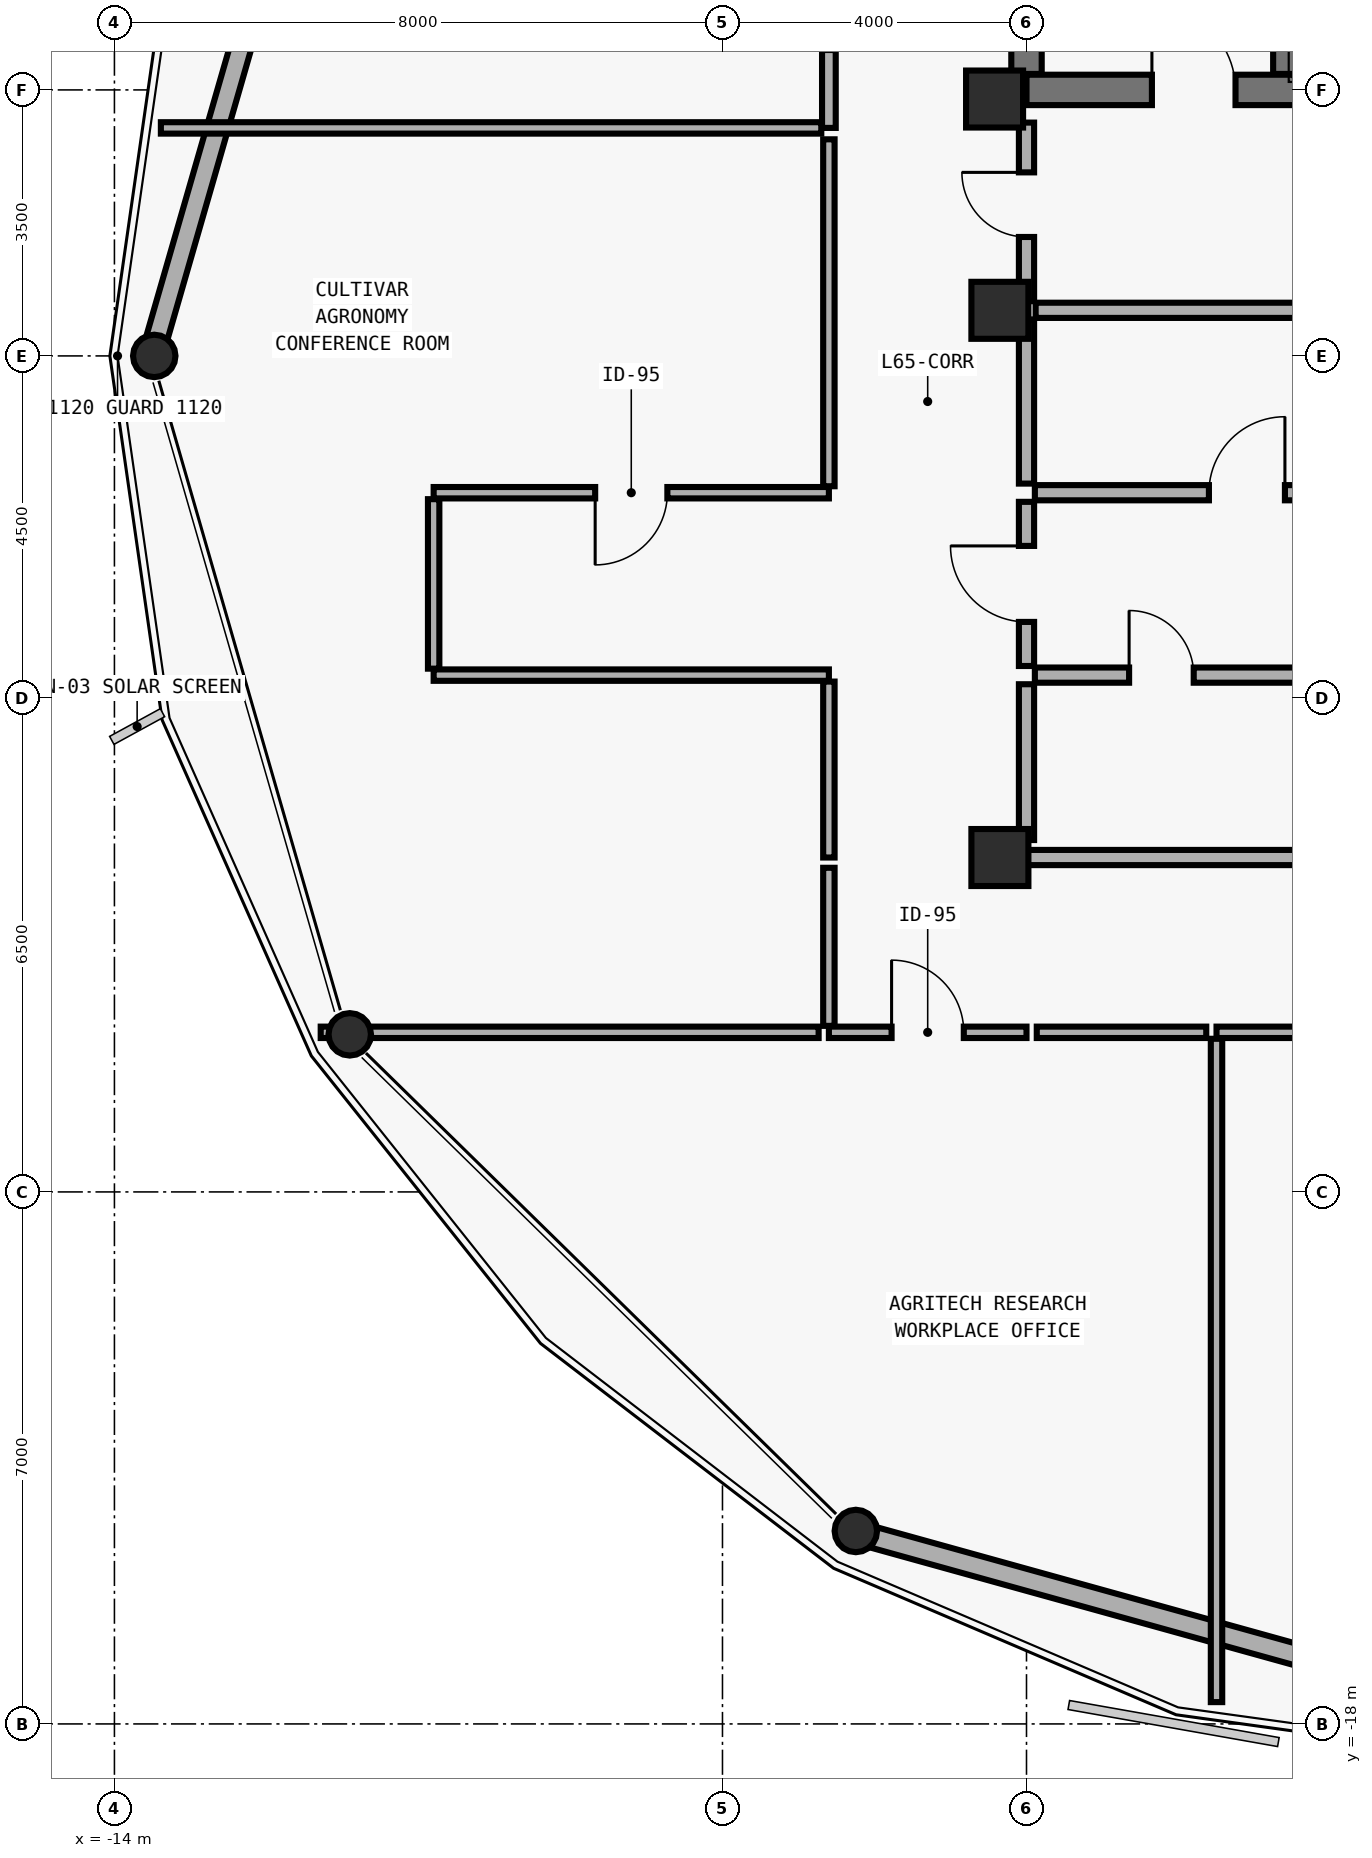
"""IFC4 building model, lengths in metres.
Left out: names, types, materials, properties, quantities, classifications, styles, units other than length and angle.
Written with IfcOpenShell. Run it as: python <this file> out.ifc"""

import sys

from ifc_helpers import new_model, si_unit, direction, frame, frame_2d, origin, origin_2d, place, context, subcontext, project, spatial, rectangle, hollow_circle, extrude, element, fill, save


model = new_model("IFC4")
c1 = context("Model", 3, precision=1e-05, world=origin(), true_north=direction((0.0, 1.0)))
c2 = subcontext(c1, "Body", "Model", "MODEL_VIEW")
j1 = project(units=[si_unit("LENGTHUNIT", "METRE"), si_unit("PLANEANGLEUNIT", "RADIAN")], contexts=[c1])
p1 = place(None, origin())
s1 = spatial("IfcSite", under=j1, at=p1, CompositionType="ELEMENT")
p2 = place(p1, origin())
s2 = spatial("IfcBuilding", under=s1, at=p2, CompositionType="ELEMENT")
p3 = place(p2, frame((0.0, 0.0, 256.2)))
s3 = spatial("IfcBuildingStorey", under=s2, at=p3, CompositionType="ELEMENT", Elevation=256.2)
p4 = place(p3, frame((-2.0, 3.5, 0.0), z_axis=(0.0, 0.0, 1.0), x_axis=(1.0, 0.0, 0.0)))
e1 = element("IfcWall", 1, at=p4, inside=s3, PredefinedType="SHEAR", context=c2, shape_type="SweptSolid", body=[
    extrude(rectangle(XDim=10.0, YDim=0.4, at=frame_2d((5.0, 0.0))), origin(), (0.0, 0.0, 1.0), 3.592),
])
p5 = place(p4, frame((1.65, 0.0, 0.0)))
e2 = element("IfcOpeningElement", 2, at=p5, cuts=e1, PredefinedType="OPENING", context=c2, shape_type="SweptSolid", body=[
    extrude(rectangle(XDim=1.1, YDim=2.15, at=frame_2d((0.55, 1.075))), frame((0.0, 0.21, 0.0), z_axis=(0.0, -1.0, 0.0), x_axis=(1.0, 0.0, 0.0)), (0.0, 0.0, 1.0), 0.42),
])
p6 = place(p4, frame((7.65, 0.0, 0.0)))
e3 = element("IfcOpeningElement", 3, at=p6, cuts=e1, PredefinedType="OPENING", context=c2, shape_type="SweptSolid", body=[
    extrude(rectangle(XDim=1.1, YDim=2.15, at=frame_2d((0.55, 1.075))), frame((0.0, 0.21, 0.0), z_axis=(0.0, -1.0, 0.0), x_axis=(1.0, 0.0, 0.0)), (0.0, 0.0, 1.0), 0.42),
])
p7 = place(p4, frame((3.72, 0.0, 0.0)))
e4 = element("IfcOpeningElement", 4, at=p7, cuts=e1, PredefinedType="OPENING", context=c2, shape_type="SweptSolid", body=[
    extrude(rectangle(XDim=1.1, YDim=2.2, at=frame_2d((0.55, 1.1))), frame((0.0, 0.21, 0.0), z_axis=(0.0, -1.0, 0.0), x_axis=(1.0, 0.0, 0.0)), (0.0, 0.0, 1.0), 0.42),
])
p8 = place(p4, frame((5.18, 0.0, 0.0)))
e5 = element("IfcOpeningElement", 5, at=p8, cuts=e1, PredefinedType="OPENING", context=c2, shape_type="SweptSolid", body=[
    extrude(rectangle(XDim=1.1, YDim=2.2, at=frame_2d((0.55, 1.1))), frame((0.0, 0.21, 0.0), z_axis=(0.0, -1.0, 0.0), x_axis=(1.0, 0.0, 0.0)), (0.0, 0.0, 1.0), 0.42),
])
p9 = place(p3, frame((-2.0, 3.71, 0.0), z_axis=(0.0, 0.0, 1.0), x_axis=(0.0, 1.0, 0.0)))
e6 = element("IfcWall", 6, at=p9, inside=s3, PredefinedType="SHEAR", context=c2, shape_type="SweptSolid", body=[
    extrude(rectangle(XDim=8.58, YDim=0.4, at=frame_2d((4.29, 0.0))), origin(), (0.0, 0.0, 1.0), 3.592),
])
p10 = place(p3, frame((1.42, 3.71, 0.0), z_axis=(0.0, 0.0, 1.0), x_axis=(0.0, 1.0, 0.0)))
e7 = element("IfcWall", 7, at=p10, inside=s3, PredefinedType="SHEAR", context=c2, shape_type="SweptSolid", body=[
    extrude(rectangle(XDim=8.58, YDim=0.35, at=frame_2d((4.29, 0.0))), origin(), (0.0, 0.0, 1.0), 3.592),
])
for number, where, z_axis, x_axis in (
    (8, (-2.42, 3.38, 0.0), (0.0, 0.0, 1.0), (1.0, 0.0, 0.0)),
    (9, (-2.35, 0.6, 0.0), (0.0, 0.0, 1.0), (1.0, 0.0, 0.0)),
    (10, (-2.35, -6.6, 0.0), (0.0, 0.0, 1.0), (1.0, 0.0, 0.0)),
):
    element("IfcColumn", number, at=place(p3, frame(where, z_axis=z_axis, x_axis=x_axis)), inside=s3, PredefinedType="COLUMN", context=c2, shape_type="SweptSolid", body=[
        extrude(rectangle(XDim=0.75, YDim=0.75, at=origin_2d()), origin(), (0.0, 0.0, 1.0), 3.575),
    ])
p11 = place(p3, frame((-13.51, 0.0, 0.0), z_axis=(0.019050015053, 0.0, 0.999818531998), x_axis=(0.0, 1.0, 0.0)))
e11 = element("IfcColumn", 11, at=p11, inside=s3, PredefinedType="COLUMN", context=c2, shape_type="SweptSolid", body=[
    extrude(hollow_circle(Radius=0.28, WallThickness=0.02, at=origin_2d()), origin(), (0.0, 0.0, 1.0), 3.576),
])
p12 = place(p3, frame((-10.933, -8.935, 0.0), z_axis=(0.016455959383, 0.00477973924, 0.999853166967), x_axis=(-0.278928739366, 0.960311802674, 0.0)))
e12 = element("IfcColumn", 12, at=p12, inside=s3, PredefinedType="COLUMN", context=c2, shape_type="SweptSolid", body=[
    extrude(hollow_circle(Radius=0.28, WallThickness=0.02, at=origin_2d()), origin(), (0.0, 0.0, 1.0), 3.575),
])
p13 = place(p3, frame((-4.262, -15.476, 0.0), z_axis=(0.00949183863, 0.008262679671, 0.999920813427), x_axis=(-0.656581650754, 0.754254954172, 0.0)))
e13 = element("IfcColumn", 13, at=p13, inside=s3, PredefinedType="COLUMN", context=c2, shape_type="SweptSolid", body=[
    extrude(hollow_circle(Radius=0.28, WallThickness=0.02, at=origin_2d()), origin(), (0.0, 0.0, 1.0), 3.575),
])
p14 = place(p3, frame((-13.445, 0.225, 0.0), z_axis=(0.0, 0.0, 1.0), x_axis=(0.277093893844, 0.960842845628, 0.0)))
e14 = element("IfcWall", 14, at=p14, inside=s3, PredefinedType="SOLIDWALL", context=c2, shape_type="SweptSolid", body=[
    extrude(rectangle(XDim=8.83, YDim=0.28, at=frame_2d((4.415, 0.0))), origin(), (0.0, 0.0, 1.0), 2.97),
])
p15 = place(p3, frame((4.624, -17.942, 0.0), z_axis=(0.0, 0.0, 1.0), x_axis=(-0.963573148657, 0.267444923653, 0.0)))
e15 = element("IfcWall", 15, at=p15, inside=s3, PredefinedType="SOLIDWALL", context=c2, shape_type="SweptSolid", body=[
    extrude(rectangle(XDim=8.988, YDim=0.28, at=frame_2d((4.494, 0.0))), origin(), (0.0, 0.0, 1.0), 2.97),
])
p16 = place(p3, frame((-2.0, 0.72, 0.0), z_axis=(0.0, 0.0, 1.0), x_axis=(0.0, 1.0, 0.0)))
e16 = element("IfcWall", 16, at=p16, inside=s3, PredefinedType="MOVABLE", context=c2, shape_type="SweptSolid", body=[
    extrude(rectangle(XDim=2.35, YDim=0.2, at=frame_2d((1.175, 0.0))), origin(), (0.0, 0.0, 1.0), 2.692),
])
p17 = place(p16, frame((0.845, 0.0, 0.0)))
e17 = element("IfcOpeningElement", 17, at=p17, cuts=e16, PredefinedType="OPENING", context=c2, shape_type="SweptSolid", body=[
    extrude(rectangle(XDim=0.85, YDim=2.1, at=frame_2d((0.425, 1.05))), frame((0.0, 0.11, 0.0), z_axis=(0.0, -1.0, 0.0), x_axis=(1.0, 0.0, 0.0)), (0.0, 0.0, 1.0), 0.22),
])
p18 = place(p3, frame((-2.0, -4.08, 0.0), z_axis=(0.0, 0.0, 1.0), x_axis=(0.0, 1.0, 0.0)))
e18 = element("IfcWall", 18, at=p18, inside=s3, PredefinedType="MOVABLE", context=c2, shape_type="SweptSolid", body=[
    extrude(rectangle(XDim=2.16, YDim=0.2, at=frame_2d((1.08, 0.0))), origin(), (0.0, 0.0, 1.0), 3.072),
])
p19 = place(p18, frame((0.58, 0.0, 0.0)))
e19 = element("IfcOpeningElement", 19, at=p19, cuts=e18, PredefinedType="OPENING", context=c2, shape_type="SweptSolid", body=[
    extrude(rectangle(XDim=1.0, YDim=2.1, at=frame_2d((0.5, 1.05))), frame((0.0, 0.11, 0.0), z_axis=(0.0, -1.0, 0.0), x_axis=(1.0, 0.0, 0.0)), (0.0, 0.0, 1.0), 0.22),
])
p20 = place(p3, frame((-1.89, -1.8, 0.0), z_axis=(0.0, 0.0, 1.0), x_axis=(1.0, 0.0, 0.0)))
e20 = element("IfcWall", 20, at=p20, inside=s3, PredefinedType="MOVABLE", context=c2, shape_type="SweptSolid", body=[
    extrude(rectangle(XDim=5.73, YDim=0.2, at=frame_2d((2.865, 0.0))), origin(), (0.0, 0.0, 1.0), 3.36),
])
p21 = place(p20, frame((2.29, 0.0, 0.0)))
e21 = element("IfcOpeningElement", 21, at=p21, cuts=e20, PredefinedType="OPENING", context=c2, shape_type="SweptSolid", body=[
    extrude(rectangle(XDim=1.0, YDim=2.1, at=frame_2d((0.5, 1.05))), frame((0.0, 0.11, 0.0), z_axis=(0.0, -1.0, 0.0), x_axis=(1.0, 0.0, 0.0)), (0.0, 0.0, 1.0), 0.22),
])
p22 = place(p3, frame((-1.89, -4.2, 0.0), z_axis=(0.0, 0.0, 1.0), x_axis=(1.0, 0.0, 0.0)))
e22 = element("IfcWall", 22, at=p22, inside=s3, PredefinedType="MOVABLE", context=c2, shape_type="SweptSolid", body=[
    extrude(rectangle(XDim=5.73, YDim=0.2, at=frame_2d((2.865, 0.0))), origin(), (0.0, 0.0, 1.0), 3.36),
])
p23 = place(p22, frame((1.24, 0.0, 0.0)))
e23 = element("IfcOpeningElement", 23, at=p23, cuts=e22, PredefinedType="OPENING", context=c2, shape_type="SweptSolid", body=[
    extrude(rectangle(XDim=0.85, YDim=2.1, at=frame_2d((0.425, 1.05))), frame((0.0, 0.11, 0.0), z_axis=(0.0, -1.0, 0.0), x_axis=(1.0, 0.0, 0.0)), (0.0, 0.0, 1.0), 0.22),
])
p24 = place(p22, frame((4.34, 0.0, 0.0)))
e24 = element("IfcOpeningElement", 24, at=p24, cuts=e22, PredefinedType="OPENING", context=c2, shape_type="SweptSolid", body=[
    extrude(rectangle(XDim=0.85, YDim=2.1, at=frame_2d((0.425, 1.05))), frame((0.0, 0.11, 0.0), z_axis=(0.0, -1.0, 0.0), x_axis=(1.0, 0.0, 0.0)), (0.0, 0.0, 1.0), 0.22),
])
p25 = place(p3, frame((-4.6, -8.9, 0.0), z_axis=(0.0, 0.0, 1.0), x_axis=(1.0, 0.0, 0.0)))
e25 = element("IfcWall", 25, at=p25, inside=s3, PredefinedType="PARTITIONING", context=c2, shape_type="SweptSolid", body=[
    extrude(rectangle(XDim=2.6, YDim=0.15, at=frame_2d((1.3, 0.0))), origin(), (0.0, 0.0, 1.0), 3.36),
])
p26 = place(p25, frame((0.825, 0.0, 0.0)))
e26 = element("IfcOpeningElement", 26, at=p26, cuts=e25, PredefinedType="OPENING", context=c2, shape_type="SweptSolid", body=[
    extrude(rectangle(XDim=0.95, YDim=2.1, at=frame_2d((0.475, 1.05))), frame((0.0, 0.085, 0.0), z_axis=(0.0, -1.0, 0.0), x_axis=(1.0, 0.0, 0.0)), (0.0, 0.0, 1.0), 0.17),
])
p27 = place(p3, frame((0.5, -8.9, 0.0), z_axis=(0.0, 0.0, 1.0), x_axis=(1.0, 0.0, 0.0)))
e27 = element("IfcWall", 27, at=p27, inside=s3, PredefinedType="PARTITIONING", context=c2, shape_type="SweptSolid", body=[
    extrude(rectangle(XDim=7.5, YDim=0.15, at=frame_2d((3.75, 0.0))), origin(), (0.0, 0.0, 1.0), 3.36),
])
p28 = place(p27, frame((3.275, 0.0, 0.0)))
e28 = element("IfcOpeningElement", 28, at=p28, cuts=e27, PredefinedType="OPENING", context=c2, shape_type="SweptSolid", body=[
    extrude(rectangle(XDim=0.95, YDim=2.1, at=frame_2d((0.475, 1.05))), frame((0.0, 0.085, 0.0), z_axis=(0.0, -1.0, 0.0), x_axis=(1.0, 0.0, 0.0)), (0.0, 0.0, 1.0), 0.17),
])
p29 = place(p3, frame((-4.6, -1.8, 0.0), z_axis=(0.0, 0.0, 1.0), x_axis=(-1.0, 0.0, 0.0)))
e29 = element("IfcWall", 29, at=p29, inside=s3, PredefinedType="PARTITIONING", context=c2, shape_type="SweptSolid", body=[
    extrude(rectangle(XDim=5.2, YDim=0.15, at=frame_2d((2.6, 0.0))), origin(), (0.0, 0.0, 1.0), 3.36),
])
p30 = place(p29, frame((2.125, 0.0, 0.0)))
e30 = element("IfcOpeningElement", 30, at=p30, cuts=e29, PredefinedType="OPENING", context=c2, shape_type="SweptSolid", body=[
    extrude(rectangle(XDim=0.95, YDim=2.1, at=frame_2d((0.475, 1.05))), frame((0.0, 0.085, 0.0), z_axis=(0.0, -1.0, 0.0), x_axis=(1.0, 0.0, 0.0)), (0.0, 0.0, 1.0), 0.17),
])
p31 = place(p3, frame((-4.6, 6.0, 0.0), z_axis=(0.0, 0.0, 1.0), x_axis=(0.0, -1.0, 0.0)))
e31 = element("IfcWall", 31, at=p31, inside=s3, PredefinedType="PLUMBINGWALL", context=c2, shape_type="SweptSolid", body=[
    extrude(rectangle(XDim=3.0, YDim=0.18, at=frame_2d((1.5, 0.0))), origin(), (0.0, 0.0, 1.0), 3.36),
])
p32 = place(p31, frame((1.025, 0.0, 0.0)))
e32 = element("IfcOpeningElement", 32, at=p32, cuts=e31, PredefinedType="OPENING", context=c2, shape_type="SweptSolid", body=[
    extrude(rectangle(XDim=0.95, YDim=2.1, at=frame_2d((0.475, 1.05))), frame((0.0, 0.1, 0.0), z_axis=(0.0, -1.0, 0.0), x_axis=(1.0, 0.0, 0.0)), (0.0, 0.0, 1.0), 0.2),
])
p33 = place(p3, frame((-1.88, 0.6, 0.0), z_axis=(0.0, 0.0, 1.0), x_axis=(1.0, 0.0, 0.0)))
e33 = element("IfcWall", 33, at=p33, inside=s3, PredefinedType="MOVABLE", context=c2, shape_type="SweptSolid", body=[
    extrude(rectangle(XDim=5.72, YDim=0.2, at=frame_2d((2.86, 0.0))), origin(), (0.0, 0.0, 1.0), 3.072),
])
p34 = place(p3, frame((-2.0, -1.68, 0.0), z_axis=(0.0, 0.0, 1.0), x_axis=(0.0, 1.0, 0.0)))
e34 = element("IfcWall", 34, at=p34, inside=s3, PredefinedType="MOVABLE", context=c2, shape_type="SweptSolid", body=[
    extrude(rectangle(XDim=2.16, YDim=0.2, at=frame_2d((1.08, 0.0))), origin(), (0.0, 0.0, 1.0), 3.072),
])
p35 = place(p3, frame((-2.0, -6.6, 0.0), z_axis=(0.0, 0.0, 1.0), x_axis=(1.0, 0.0, 0.0)))
e35 = element("IfcWall", 35, at=p35, inside=s3, PredefinedType="MOVABLE", context=c2, shape_type="SweptSolid", body=[
    extrude(rectangle(XDim=5.84, YDim=0.2, at=frame_2d((2.92, 0.0))), origin(), (0.0, 0.0, 1.0), 3.072),
])
p36 = place(p3, frame((-2.0, -6.37, 0.0), z_axis=(0.0, 0.0, 1.0), x_axis=(0.0, 1.0, 0.0)))
e36 = element("IfcWall", 36, at=p36, inside=s3, PredefinedType="MOVABLE", context=c2, shape_type="SweptSolid", body=[
    extrude(rectangle(XDim=2.05, YDim=0.2, at=frame_2d((1.025, 0.0))), origin(), (0.0, 0.0, 1.0), 3.072),
])
p37 = place(p3, frame((-1.865, -8.9, 0.0), z_axis=(0.0, 0.0, 1.0), x_axis=(1.0, 0.0, 0.0)))
e37 = element("IfcWall", 37, at=p37, inside=s3, PredefinedType="PARTITIONING", context=c2, shape_type="SweptSolid", body=[
    extrude(rectangle(XDim=2.23, YDim=0.15, at=frame_2d((1.115, 0.0))), origin(), (0.0, 0.0, 1.0), 3.36),
])
p38 = place(p3, frame((0.5, -8.985, 0.0), z_axis=(0.0, 0.0, 1.0), x_axis=(0.0, -1.0, 0.0)))
e38 = element("IfcWall", 38, at=p38, inside=s3, PredefinedType="PARTITIONING", context=c2, shape_type="SweptSolid", body=[
    extrude(rectangle(XDim=8.728, YDim=0.15, at=frame_2d((4.364, 0.0))), origin(), (0.0, 0.0, 1.0), 3.36),
])
p39 = place(p3, frame((-11.286, -8.9, 0.0), z_axis=(0.0, 0.0, 1.0), x_axis=(1.0, 0.0, 0.0)))
e39 = element("IfcWall", 39, at=p39, inside=s3, PredefinedType="PARTITIONING", context=c2, shape_type="SweptSolid", body=[
    extrude(rectangle(XDim=6.551, YDim=0.15, at=frame_2d((3.275, 0.0))), origin(), (0.0, 0.0, 1.0), 2.892),
])
p40 = place(p3, frame((-9.8, -4.2, 0.0), z_axis=(0.0, 0.0, 1.0), x_axis=(1.0, 0.0, 0.0)))
e40 = element("IfcWall", 40, at=p40, inside=s3, PredefinedType="PARTITIONING", context=c2, shape_type="SweptSolid", body=[
    extrude(rectangle(XDim=5.2, YDim=0.15, at=frame_2d((2.6, 0.0))), origin(), (0.0, 0.0, 1.0), 3.36),
])
p41 = place(p3, frame((-4.6, 2.85, 0.0), z_axis=(0.0, 0.0, 1.0), x_axis=(0.0, -1.0, 0.0)))
e41 = element("IfcWall", 41, at=p41, inside=s3, PredefinedType="PARTITIONING", context=c2, shape_type="SweptSolid", body=[
    extrude(rectangle(XDim=4.565, YDim=0.15, at=frame_2d((2.283, 0.0))), origin(), (0.0, 0.0, 1.0), 3.36),
])
p42 = place(p3, frame((-9.8, -1.885, 0.0), z_axis=(0.0, 0.0, 1.0), x_axis=(0.0, -1.0, 0.0)))
e42 = element("IfcWall", 42, at=p42, inside=s3, PredefinedType="PARTITIONING", context=c2, shape_type="SweptSolid", body=[
    extrude(rectangle(XDim=2.23, YDim=0.15, at=frame_2d((1.115, 0.0))), origin(), (0.0, 0.0, 1.0), 3.36),
])
p43 = place(p3, frame((-4.6, -4.285, 0.0), z_axis=(0.0, 0.0, 1.0), x_axis=(0.0, -1.0, 0.0)))
e43 = element("IfcWall", 43, at=p43, inside=s3, PredefinedType="PARTITIONING", context=c2, shape_type="SweptSolid", body=[
    extrude(rectangle(XDim=2.315, YDim=0.15, at=frame_2d((1.158, 0.0))), origin(), (0.0, 0.0, 1.0), 3.36),
])
p44 = place(p3, frame((-4.6, -6.735, 0.0), z_axis=(0.0, 0.0, 1.0), x_axis=(0.0, -1.0, 0.0)))
e44 = element("IfcWall", 44, at=p44, inside=s3, PredefinedType="PARTITIONING", context=c2, shape_type="SweptSolid", body=[
    extrude(rectangle(XDim=2.08, YDim=0.15, at=frame_2d((1.04, 0.0))), origin(), (0.0, 0.0, 1.0), 3.36),
])
p45 = place(p3, frame((-13.389, 3.0, 0.0), z_axis=(0.0, 0.0, 1.0), x_axis=(1.0, 0.0, 0.0)))
e45 = element("IfcWall", 45, at=p45, inside=s3, PredefinedType="PARTITIONING", context=c2, shape_type="SweptSolid", body=[
    extrude(rectangle(XDim=8.689, YDim=0.15, at=frame_2d((4.344, 0.0))), origin(), (0.0, 0.0, 1.0), 3.36),
])
p46 = place(p5, origin())
e46 = element("IfcDoor", 46, at=p46, inside=s3, OperationType="SINGLE_SWING_LEFT", PredefinedType="DOOR", context=c2, shape_type="SweptSolid", body=[
    extrude(rectangle(XDim=1.1, YDim=2.15, at=frame_2d((0.55, 1.075))), frame((0.0, 0.025, 0.0), z_axis=(0.0, -1.0, 0.0), x_axis=(1.0, 0.0, 0.0)), (0.0, 0.0, 1.0), 0.05),
])
fill(e2, e46)
p47 = place(p17, origin())
e47 = element("IfcDoor", 47, at=p47, inside=s3, OperationType="SINGLE_SWING_RIGHT", PredefinedType="DOOR", context=c2, shape_type="SweptSolid", body=[
    extrude(rectangle(XDim=0.85, YDim=2.1, at=frame_2d((0.425, 1.05))), frame((0.0, 0.025, 0.0), z_axis=(0.0, -1.0, 0.0), x_axis=(1.0, 0.0, 0.0)), (0.0, 0.0, 1.0), 0.05),
])
fill(e17, e47)
p48 = place(p19, origin())
e48 = element("IfcDoor", 48, at=p48, inside=s3, OperationType="SINGLE_SWING_RIGHT", PredefinedType="DOOR", context=c2, shape_type="SweptSolid", body=[
    extrude(rectangle(XDim=1.0, YDim=2.1, at=frame_2d((0.5, 1.05))), frame((0.0, 0.025, 0.0), z_axis=(0.0, -1.0, 0.0), x_axis=(1.0, 0.0, 0.0)), (0.0, 0.0, 1.0), 0.05),
])
fill(e19, e48)
p49 = place(p21, origin())
e49 = element("IfcDoor", 49, at=p49, inside=s3, OperationType="SINGLE_SWING_RIGHT", PredefinedType="DOOR", context=c2, shape_type="SweptSolid", body=[
    extrude(rectangle(XDim=1.0, YDim=2.1, at=frame_2d((0.5, 1.05))), frame((0.0, 0.025, 0.0), z_axis=(0.0, -1.0, 0.0), x_axis=(1.0, 0.0, 0.0)), (0.0, 0.0, 1.0), 0.05),
])
fill(e21, e49)
p50 = place(p23, origin())
e50 = element("IfcDoor", 50, at=p50, inside=s3, OperationType="SINGLE_SWING_LEFT", PredefinedType="DOOR", context=c2, shape_type="SweptSolid", body=[
    extrude(rectangle(XDim=0.85, YDim=2.1, at=frame_2d((0.425, 1.05))), frame((0.0, 0.025, 0.0), z_axis=(0.0, -1.0, 0.0), x_axis=(1.0, 0.0, 0.0)), (0.0, 0.0, 1.0), 0.05),
])
fill(e23, e50)
p51 = place(p26, origin())
e51 = element("IfcDoor", 51, at=p51, inside=s3, OperationType="SINGLE_SWING_LEFT", PredefinedType="DOOR", context=c2, shape_type="SweptSolid", body=[
    extrude(rectangle(XDim=0.95, YDim=2.1, at=frame_2d((0.475, 1.05))), frame((0.0, 0.025, 0.0), z_axis=(0.0, -1.0, 0.0), x_axis=(1.0, 0.0, 0.0)), (0.0, 0.0, 1.0), 0.05),
])
fill(e26, e51)
p52 = place(p30, origin())
e52 = element("IfcDoor", 52, at=p52, inside=s3, OperationType="SINGLE_SWING_RIGHT", PredefinedType="DOOR", context=c2, shape_type="SweptSolid", body=[
    extrude(rectangle(XDim=0.95, YDim=2.1, at=frame_2d((0.475, 1.05))), frame((0.0, 0.025, 0.0), z_axis=(0.0, -1.0, 0.0), x_axis=(1.0, 0.0, 0.0)), (0.0, 0.0, 1.0), 0.05),
])
fill(e30, e52)
save(model, sys.argv[1])
